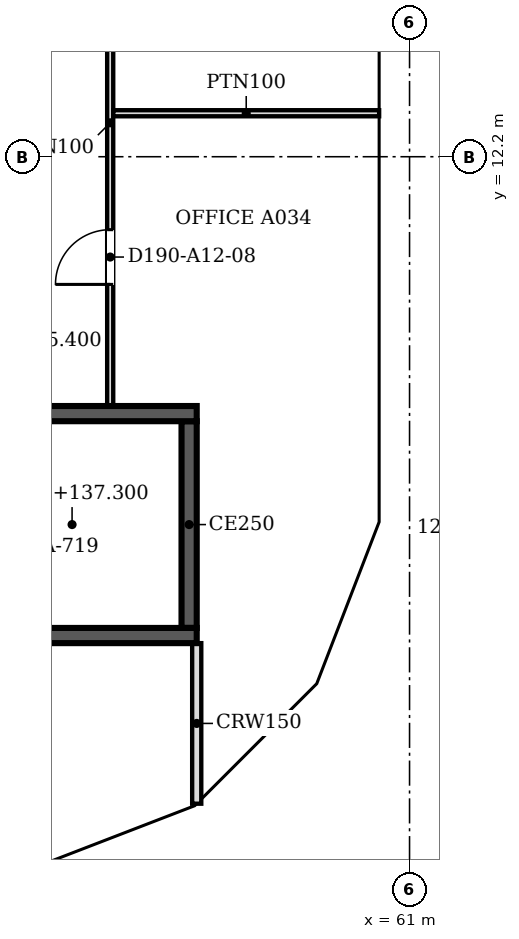
"""IFC4 building model, lengths in metres.
Left out: names, types, materials, properties, quantities, classifications, styles, units other than length and angle.
Written with IfcOpenShell. Run it as: python <this file> out.ifc"""

import sys

from ifc_helpers import new_model, si_unit, direction, frame, frame_2d, origin, place, context, subcontext, project, spatial, polyline, rectangle, outline, extrude, faceted_brep, source, transform, mapped, element, fill, save


model = new_model("IFC4")
c1 = context("Model", 3, precision=1e-05, world=origin(), true_north=direction((0.0, 1.0)))
c2 = subcontext(c1, "Body", "Model", "MODEL_VIEW")
j1 = project(units=[si_unit("LENGTHUNIT", "METRE"), si_unit("PLANEANGLEUNIT", "RADIAN")], contexts=[c1])
p1 = place(None, origin())
s1 = spatial("IfcSite", under=j1, at=p1, CompositionType="ELEMENT")
p2 = place(p1, origin())
s2 = spatial("IfcBuilding", under=s1, at=p2, CompositionType="ELEMENT")
p3 = place(p2, frame((0.0, 0.0, 135.4)))
s3 = spatial("IfcBuildingStorey", under=s2, at=p3, CompositionType="ELEMENT", Elevation=135.4)
m1 = source(origin(), c2, "Body", "Brep", [
    faceted_brep([(0.047, -0.25, 0.0), (2.997, -0.25, 3.8), (0.047, -0.25, 7.6), (0.0, -0.25, 7.541), (0.0, -0.25, 0.059), (0.093, 0.25, 7.54), (2.944, 0.25, 3.868), (2.944, 0.25, 3.732), (0.093, 0.25, 0.06), (2.997, 0.0, 3.8), (0.047, 0.0, 0.0), (0.047, 0.0, 7.6)], [[[0, 1, 2, 3, 4]], [[5, 6, 7, 8]], [[8, 7, 9, 1, 0, 10]], [[6, 5, 11, 2, 1, 9]], [[3, 2, 11]], [[10, 0, 4]], [[8, 10, 4, 3, 11, 5]], [[9, 7, 6]]]),
])
p4 = place(p3, frame((54.81, 0.233, -3.8), z_axis=(0.0, 0.0, 1.0), x_axis=(0.932990326376, 0.359901446078, 0.0)))
e1 = element("IfcWall", 1, at=p4, inside=s3, PredefinedType="SOLIDWALL", context=c2, shape_type="MappedRepresentation", body=[
    mapped(m1, transform((0.0, 0.0, 0.0), scale=1.0)),
])
m2 = source(origin(), c2, "Body", "SweptSolid", [
    extrude(outline(polyline([(0.247, 0.665), (2.681, 3.8), (0.247, 6.935), (0.247, 0.665)])), frame((0.0, 0.26, 0.0), z_axis=(0.0, -1.0, 0.0), x_axis=(1.0, 0.0, 0.0)), (0.0, 0.0, 1.0), 0.52),
])
p5 = place(p4, origin())
e2 = element("IfcOpeningElement", 2, at=p5, cuts=e1, PredefinedType="OPENING", context=c2, shape_type="MappedRepresentation", body=[
    mapped(m2, transform((0.0, 0.0, 0.0), scale=1.0)),
])
m3 = source(origin(), c2, "Body", "Brep", [
    faceted_brep([(2.944, -0.25, 0.0), (2.997, -0.25, 0.068), (2.997, -0.25, 7.532), (2.944, -0.25, 7.6), (0.0, -0.25, 3.8), (0.053, 0.25, 3.868), (2.891, 0.25, 7.532), (2.891, 0.25, 0.068), (0.053, 0.25, 3.731), (2.944, 0.0, 0.0), (2.944, 0.0, 7.6), (0.0, 0.0, 3.8)], [[[0, 1, 2, 3, 4]], [[5, 6, 7, 8]], [[1, 0, 9]], [[10, 3, 2]], [[6, 5, 11, 4, 3, 10]], [[8, 7, 9, 0, 4, 11]], [[8, 11, 5]], [[1, 9, 7, 6, 10, 2]]]),
])
p6 = place(p3, frame((57.606, 1.312, -3.8), z_axis=(0.0, 0.0, 1.0), x_axis=(0.707147509625, 0.707066050402, 0.0)))
e3 = element("IfcWall", 3, at=p6, inside=s3, PredefinedType="SOLIDWALL", context=c2, shape_type="MappedRepresentation", body=[
    mapped(m3, transform((0.0, 0.0, 0.0), scale=1.0)),
])
m4 = source(origin(), c2, "Body", "SweptSolid", [
    extrude(outline(polyline([(2.744, 6.934), (0.316, 3.8), (2.744, 0.666), (2.744, 6.934)])), frame((0.0, 0.26, 0.0), z_axis=(0.0, -1.0, 0.0), x_axis=(1.0, 0.0, 0.0)), (0.0, 0.0, 1.0), 0.52),
])
p7 = place(p6, origin())
e4 = element("IfcOpeningElement", 4, at=p7, cuts=e3, PredefinedType="OPENING", context=c2, shape_type="MappedRepresentation", body=[
    mapped(m4, transform((0.0, 0.0, 0.0), scale=1.0)),
])
m5 = source(origin(), c2, "Body", "Brep", [
    faceted_brep([(0.053, -0.25, 0.0), (3.003, -0.25, 3.8), (0.053, -0.25, 7.6), (0.0, -0.25, 7.531), (0.0, -0.25, 0.068), (0.106, 0.25, 7.532), (2.957, 0.25, 3.86), (2.957, 0.25, 3.74), (0.106, 0.25, 0.068), (3.003, 0.0, 3.8), (0.053, 0.0, 0.0), (0.053, 0.0, 7.6)], [[[0, 1, 2, 3, 4]], [[5, 6, 7, 8]], [[8, 7, 9, 1, 0, 10]], [[6, 5, 11, 2, 1, 9]], [[3, 2, 11]], [[10, 0, 4]], [[8, 10, 4, 3, 11, 5]], [[9, 7, 6]]]),
])
p8 = place(p3, frame((59.669, 3.344, -3.8), z_axis=(0.0, 0.0, 1.0), x_axis=(0.35992665181, 0.932980602862, 0.0)))
e5 = element("IfcWall", 5, at=p8, inside=s3, PredefinedType="SOLIDWALL", context=c2, shape_type="MappedRepresentation", body=[
    mapped(m5, transform((0.0, 0.0, 0.0), scale=1.0)),
])
m6 = source(origin(), c2, "Body", "SweptSolid", [
    extrude(outline(polyline([(0.253, 0.665), (2.687, 3.8), (0.253, 6.935), (0.253, 0.665)])), frame((0.0, 0.26, 0.0), z_axis=(0.0, -1.0, 0.0), x_axis=(1.0, 0.0, 0.0)), (0.0, 0.0, 1.0), 0.52),
])
p9 = place(p8, origin())
e6 = element("IfcOpeningElement", 6, at=p9, cuts=e5, PredefinedType="OPENING", context=c2, shape_type="MappedRepresentation", body=[
    mapped(m6, transform((0.0, 0.0, 0.0), scale=1.0)),
])
m7 = source(origin(), c2, "Body", "Brep", [
    faceted_brep([(3.003, -0.25, 0.0), (6.053, -0.25, 3.8), (3.003, -0.25, 7.6), (0.0, -0.25, 3.8), (0.047, 0.25, 3.859), (3.003, 0.25, 7.6), (6.053, 0.25, 3.8), (3.003, 0.25, 0.0), (0.047, 0.25, 3.741), (0.0, 0.0, 3.8)], [[[0, 1, 2, 3]], [[4, 5, 6, 7, 8]], [[7, 6, 1, 0]], [[6, 5, 2, 1]], [[5, 4, 9, 3, 2]], [[8, 7, 0, 3, 9]], [[8, 9, 4]]]),
])
p10 = place(p3, frame((60.75, 6.146, -3.8), z_axis=(0.0, 0.0, 1.0), x_axis=(0.0, 1.0, 0.0)))
e7 = element("IfcWall", 7, at=p10, inside=s3, PredefinedType="SOLIDWALL", context=c2, shape_type="MappedRepresentation", body=[
    mapped(m7, transform((0.0, 0.0, 0.0), scale=1.0)),
])
m8 = source(origin(), c2, "Body", "SweptSolid", [
    extrude(outline(polyline([(3.005, 0.401), (5.733, 3.8), (3.005, 7.199), (0.319, 3.8), (3.005, 0.401)])), frame((0.0, 0.26, 0.0), z_axis=(0.0, -1.0, 0.0), x_axis=(1.0, 0.0, 0.0)), (0.0, 0.0, 1.0), 0.52),
])
p11 = place(p10, origin())
e8 = element("IfcOpeningElement", 8, at=p11, cuts=e7, PredefinedType="OPENING", context=c2, shape_type="MappedRepresentation", body=[
    mapped(m8, transform((0.0, 0.0, 0.0), scale=1.0)),
])
m9 = source(origin(), c2, "Body", "SweptSolid", [
    extrude(outline(polyline([(3.05, 0.0), (6.1, 3.8), (3.05, 7.6), (0.0, 3.8), (3.05, 0.0)])), frame((0.0, 0.25, 0.0), z_axis=(0.0, -1.0, 0.0), x_axis=(1.0, 0.0, 0.0)), (0.0, 0.0, 1.0), 0.5),
])
p12 = place(p3, frame((60.75, 12.2, -3.8), z_axis=(0.0, 0.0, 1.0), x_axis=(0.0, 1.0, 0.0)))
e9 = element("IfcWall", 9, at=p12, inside=s3, PredefinedType="SOLIDWALL", context=c2, shape_type="MappedRepresentation", body=[
    mapped(m9, transform((0.0, 0.0, 0.0), scale=1.0)),
])
m10 = source(origin(), c2, "Body", "SweptSolid", [
    extrude(outline(polyline([(3.05, 0.399), (5.78, 3.8), (3.05, 7.2), (0.321, 3.8), (3.05, 0.399)])), frame((0.0, 0.26, 0.0), z_axis=(0.0, -1.0, 0.0), x_axis=(1.0, 0.0, 0.0)), (0.0, 0.0, 1.0), 0.52),
])
p13 = place(p12, origin())
e10 = element("IfcOpeningElement", 10, at=p13, cuts=e9, PredefinedType="OPENING", context=c2, shape_type="MappedRepresentation", body=[
    mapped(m10, transform((0.0, 0.0, 0.0), scale=1.0)),
])
p14 = place(p2, frame((0.0, 0.0, 139.2)))
s4 = spatial("IfcBuildingStorey", under=s2, at=p14, CompositionType="ELEMENT", Elevation=139.2)
m11 = source(origin(), c2, "Body", "Brep", [
    faceted_brep([(2.95, -0.25, 0.0), (3.003, -0.25, 0.068), (3.003, -0.25, 7.532), (2.95, -0.25, 7.6), (0.0, -0.25, 3.8), (0.047, 0.25, 3.86), (2.898, 0.25, 7.532), (2.898, 0.25, 0.068), (0.047, 0.25, 3.74), (2.95, 0.0, 0.0), (2.95, 0.0, 7.6), (0.0, 0.0, 3.8)], [[[0, 1, 2, 3, 4]], [[5, 6, 7, 8]], [[1, 0, 9]], [[10, 3, 2]], [[6, 5, 11, 4, 3, 10]], [[8, 7, 9, 0, 4, 11]], [[8, 11, 5]], [[1, 9, 7, 6, 10, 2]]]),
])
p15 = place(p14, frame((54.854, 0.25, -3.8), z_axis=(0.0, 0.0, 1.0), x_axis=(0.932970071518, 0.359953949349, 0.0)))
e11 = element("IfcWall", 11, at=p15, inside=s4, PredefinedType="SOLIDWALL", context=c2, shape_type="MappedRepresentation", body=[
    mapped(m11, transform((0.0, 0.0, 0.0), scale=1.0)),
])
m12 = source(origin(), c2, "Body", "SweptSolid", [
    extrude(outline(polyline([(2.75, 6.935), (0.316, 3.8), (2.75, 0.665), (2.75, 6.935)])), frame((0.0, 0.26, 0.0), z_axis=(0.0, -1.0, 0.0), x_axis=(1.0, 0.0, 0.0)), (0.0, 0.0, 1.0), 0.52),
])
p16 = place(p15, origin())
e12 = element("IfcOpeningElement", 12, at=p16, cuts=e11, PredefinedType="OPENING", context=c2, shape_type="MappedRepresentation", body=[
    mapped(m12, transform((0.0, 0.0, 0.0), scale=1.0)),
])
m13 = source(origin(), c2, "Body", "Brep", [
    faceted_brep([(0.053, -0.25, 0.0), (2.997, -0.25, 3.8), (0.053, -0.25, 7.6), (0.0, -0.25, 7.532), (0.0, -0.25, 0.068), (0.106, 0.25, 7.532), (2.944, 0.25, 3.868), (2.944, 0.25, 3.732), (0.106, 0.25, 0.068), (2.997, 0.0, 3.8), (0.053, 0.0, 0.0), (0.053, 0.0, 7.6)], [[[0, 1, 2, 3, 4]], [[5, 6, 7, 8]], [[8, 7, 9, 1, 0, 10]], [[6, 5, 11, 2, 1, 9]], [[3, 2, 11]], [[10, 0, 4]], [[8, 10, 4, 3, 11, 5]], [[9, 7, 6]]]),
])
p17 = place(p14, frame((57.569, 1.274, -3.8), z_axis=(0.0, 0.0, 1.0), x_axis=(0.707066050402, 0.707147509625, 0.0)))
e13 = element("IfcWall", 13, at=p17, inside=s4, PredefinedType="SOLIDWALL", context=c2, shape_type="MappedRepresentation", body=[
    mapped(m13, transform((0.0, 0.0, 0.0), scale=1.0)),
])
m14 = source(origin(), c2, "Body", "SweptSolid", [
    extrude(outline(polyline([(0.253, 0.667), (2.681, 3.8), (0.253, 6.934), (0.253, 0.667)])), frame((0.0, 0.26, 0.0), z_axis=(0.0, -1.0, 0.0), x_axis=(1.0, 0.0, 0.0)), (0.0, 0.0, 1.0), 0.52),
])
p18 = place(p17, origin())
e14 = element("IfcOpeningElement", 14, at=p18, cuts=e13, PredefinedType="OPENING", context=c2, shape_type="MappedRepresentation", body=[
    mapped(m14, transform((0.0, 0.0, 0.0), scale=1.0)),
])
m15 = source(origin(), c2, "Body", "Brep", [
    faceted_brep([(2.95, -0.25, 0.0), (2.997, -0.25, 0.059), (2.997, -0.25, 7.541), (2.95, -0.25, 7.6), (0.0, -0.25, 3.8), (0.053, 0.25, 3.868), (2.904, 0.25, 7.54), (2.904, 0.25, 0.06), (0.053, 0.25, 3.732), (2.95, 0.0, 0.0), (2.95, 0.0, 7.6), (0.0, 0.0, 3.8)], [[[0, 1, 2, 3, 4]], [[5, 6, 7, 8]], [[1, 0, 9]], [[10, 3, 2]], [[6, 5, 11, 4, 3, 10]], [[8, 7, 9, 0, 4, 11]], [[8, 11, 5]], [[1, 9, 7, 6, 10, 2]]]),
])
p19 = place(p14, frame((59.688, 3.394, -3.8), z_axis=(0.0, 0.0, 1.0), x_axis=(0.359972353723, 0.932962970624, 0.0)))
e15 = element("IfcWall", 15, at=p19, inside=s4, PredefinedType="SOLIDWALL", context=c2, shape_type="MappedRepresentation", body=[
    mapped(m15, transform((0.0, 0.0, 0.0), scale=1.0)),
])
p20 = place(p19, origin())
e16 = element("IfcOpeningElement", 16, at=p20, cuts=e15, PredefinedType="OPENING", context=c2, shape_type="MappedRepresentation", body=[
    mapped(m12, transform((0.0, 0.0, 0.0), scale=1.0)),
])
m16 = source(origin(), c2, "Body", "Brep", [
    faceted_brep([(0.047, -0.25, 0.0), (3.05, -0.25, 3.8), (0.047, -0.25, 7.6), (0.0, -0.25, 7.54), (0.0, -0.25, 0.06), (0.093, 0.25, 7.541), (3.05, 0.25, 3.8), (0.093, 0.25, 0.059), (0.047, 0.0, 0.0), (0.047, 0.0, 7.6)], [[[0, 1, 2, 3, 4]], [[5, 6, 7]], [[7, 6, 1, 0, 8]], [[6, 5, 9, 2, 1]], [[3, 2, 9]], [[8, 0, 4]], [[7, 8, 4, 3, 9, 5]]]),
])
p21 = place(p14, frame((60.75, 6.1, -3.8), z_axis=(0.0, 0.0, 1.0), x_axis=(0.0, 1.0, 0.0)))
e17 = element("IfcWall", 17, at=p21, inside=s4, PredefinedType="SOLIDWALL", context=c2, shape_type="MappedRepresentation", body=[
    mapped(m16, transform((0.0, 0.0, 0.0), scale=1.0)),
])
m17 = source(origin(), c2, "Body", "SweptSolid", [
    extrude(outline(polyline([(0.247, 0.656), (2.731, 3.8), (0.247, 6.944), (0.247, 0.656)])), frame((0.0, 0.26, 0.0), z_axis=(0.0, -1.0, 0.0), x_axis=(1.0, 0.0, 0.0)), (0.0, 0.0, 1.0), 0.52),
])
p22 = place(p21, origin())
e18 = element("IfcOpeningElement", 18, at=p22, cuts=e17, PredefinedType="OPENING", context=c2, shape_type="MappedRepresentation", body=[
    mapped(m17, transform((0.0, 0.0, 0.0), scale=1.0)),
])
m18 = source(origin(), c2, "Body", "SweptSolid", [
    extrude(outline(polyline([(3.05, 0.0), (6.1, 3.8), (3.05, 7.6), (0.0, 3.8), (3.05, 0.0)])), frame((0.0, 0.25, 0.0), z_axis=(0.0, -1.0, 0.0), x_axis=(1.0, 0.0, 0.0)), (0.0, 0.0, 1.0), 0.5),
])
p23 = place(p14, frame((60.75, 9.15, -3.8), z_axis=(0.0, 0.0, 1.0), x_axis=(0.0, 1.0, 0.0)))
e19 = element("IfcWall", 19, at=p23, inside=s4, PredefinedType="SOLIDWALL", context=c2, shape_type="MappedRepresentation", body=[
    mapped(m18, transform((0.0, 0.0, 0.0), scale=1.0)),
])
m19 = source(origin(), c2, "Body", "SweptSolid", [
    extrude(outline(polyline([(3.05, 0.399), (5.78, 3.8), (3.05, 7.201), (0.321, 3.8), (3.05, 0.399)])), frame((0.0, 0.26, 0.0), z_axis=(0.0, -1.0, 0.0), x_axis=(1.0, 0.0, 0.0)), (0.0, 0.0, 1.0), 0.52),
])
p24 = place(p23, origin())
e20 = element("IfcOpeningElement", 20, at=p24, cuts=e19, PredefinedType="OPENING", context=c2, shape_type="MappedRepresentation", body=[
    mapped(m19, transform((0.0, 0.0, 0.0), scale=1.0)),
])
p25 = place(p3, frame((57.5, 4.325, 0.0), z_axis=(0.0, 0.0, 1.0), x_axis=(-1.0, 0.0, 0.0)))
e21 = element("IfcWall", 21, at=p25, inside=s3, PredefinedType="SOLIDWALL", context=c2, shape_type="SweptSolid", body=[
    extrude(rectangle(XDim=8.5, YDim=0.25, at=frame_2d((4.25, 0.0))), origin(), (0.0, 0.0, 1.0), 3.8),
])
m20 = source(origin(), c2, "Body", "SweptSolid", [
    extrude(rectangle(XDim=1.2, YDim=2.1, at=frame_2d((0.6, 1.05))), frame((0.0, 0.135, 0.0), z_axis=(0.0, -1.0, 0.0), x_axis=(1.0, 0.0, 0.0)), (0.0, 0.0, 1.0), 0.27),
])
p26 = place(p25, frame((6.9, 0.0, 0.0)))
e22 = element("IfcOpeningElement", 22, at=p26, cuts=e21, PredefinedType="OPENING", context=c2, shape_type="MappedRepresentation", body=[
    mapped(m20, transform((0.0, 0.0, 0.0), scale=1.0)),
])
p27 = place(p3, frame((49.0, 7.975, 0.0), z_axis=(0.0, 0.0, 1.0), x_axis=(1.0, 0.0, 0.0)))
e23 = element("IfcWall", 23, at=p27, inside=s3, PredefinedType="SOLIDWALL", context=c2, shape_type="SweptSolid", body=[
    extrude(rectangle(XDim=8.5, YDim=0.25, at=frame_2d((4.25, 0.0))), origin(), (0.0, 0.0, 1.0), 3.8),
])
p28 = place(p3, frame((57.375, 7.85, 0.0), z_axis=(0.0, 0.0, 1.0), x_axis=(0.0, -1.0, 0.0)))
e24 = element("IfcWall", 24, at=p28, inside=s3, PredefinedType="SOLIDWALL", context=c2, shape_type="SweptSolid", body=[
    extrude(rectangle(XDim=3.4, YDim=0.25, at=frame_2d((1.7, 0.0))), origin(), (0.0, 0.0, 1.0), 3.8),
])
p29 = place(p3, frame((57.5, 1.559, 0.0), z_axis=(0.0, 0.0, 1.0), x_axis=(0.0, 1.0, 0.0)))
e25 = element("IfcWall", 25, at=p29, inside=s3, PredefinedType="PARTITIONING", context=c2, shape_type="SweptSolid", body=[
    extrude(rectangle(XDim=2.641, YDim=0.15, at=frame_2d((1.32, 0.0))), origin(), (0.0, 0.0, 1.0), 3.067),
])
p30 = place(p3, frame((56.077, 17.024, 0.0), z_axis=(0.0, 0.0, 1.0), x_axis=(0.0, -1.0, 0.0)))
e26 = element("IfcWall", 26, at=p30, inside=s3, PredefinedType="PARTITIONING", context=c2, shape_type="SweptSolid", body=[
    extrude(rectangle(XDim=8.924, YDim=0.1, at=frame_2d((4.462, 0.0))), origin(), (0.0, 0.0, 1.0), 3.067),
])
m21 = source(origin(), c2, "Body", "SweptSolid", [
    extrude(rectangle(XDim=0.9, YDim=2.1, at=frame_2d((0.45, 1.05))), frame((0.0, 0.06, 0.0), z_axis=(0.0, -1.0, 0.0), x_axis=(1.0, 0.0, 0.0)), (0.0, 0.0, 1.0), 0.12),
])
p31 = place(p30, frame((1.608, 0.0, 0.0)))
e27 = element("IfcOpeningElement", 27, at=p31, cuts=e26, PredefinedType="OPENING", context=c2, shape_type="MappedRepresentation", body=[
    mapped(m21, transform((0.0, 0.0, 0.0), scale=1.0)),
])
p32 = place(p30, frame((6.024, 0.0, 0.0)))
e28 = element("IfcOpeningElement", 28, at=p32, cuts=e26, PredefinedType="OPENING", context=c2, shape_type="MappedRepresentation", body=[
    mapped(m21, transform((0.0, 0.0, 0.0), scale=1.0)),
])
p33 = place(p3, frame((56.128, 12.915, 0.0), z_axis=(0.0, 0.0, 1.0), x_axis=(1.0, 0.0, 0.0)))
e29 = element("IfcWall", 29, at=p33, inside=s3, PredefinedType="PARTITIONING", context=c2, shape_type="SweptSolid", body=[
    extrude(rectangle(XDim=4.372, YDim=0.1, at=frame_2d((2.186, 0.0))), origin(), (0.0, 0.0, 1.0), 3.067),
])
m22 = source(origin(), c2, "Body", "SweptSolid", [
    extrude(rectangle(XDim=0.9, YDim=2.1, at=frame_2d((0.45, 1.05))), frame((0.0, 0.025, 0.0), z_axis=(0.0, -1.0, 0.0), x_axis=(1.0, 0.0, 0.0)), (0.0, 0.0, 1.0), 0.05),
])
p34 = place(p32, origin())
e30 = element("IfcDoor", 30, at=p34, inside=s3, OperationType="SINGLE_SWING_RIGHT", PredefinedType="DOOR", context=c2, shape_type="MappedRepresentation", body=[
    mapped(m22, transform((0.0, 0.0, 0.0), scale=1.0)),
])
fill(e28, e30)
save(model, sys.argv[1])
